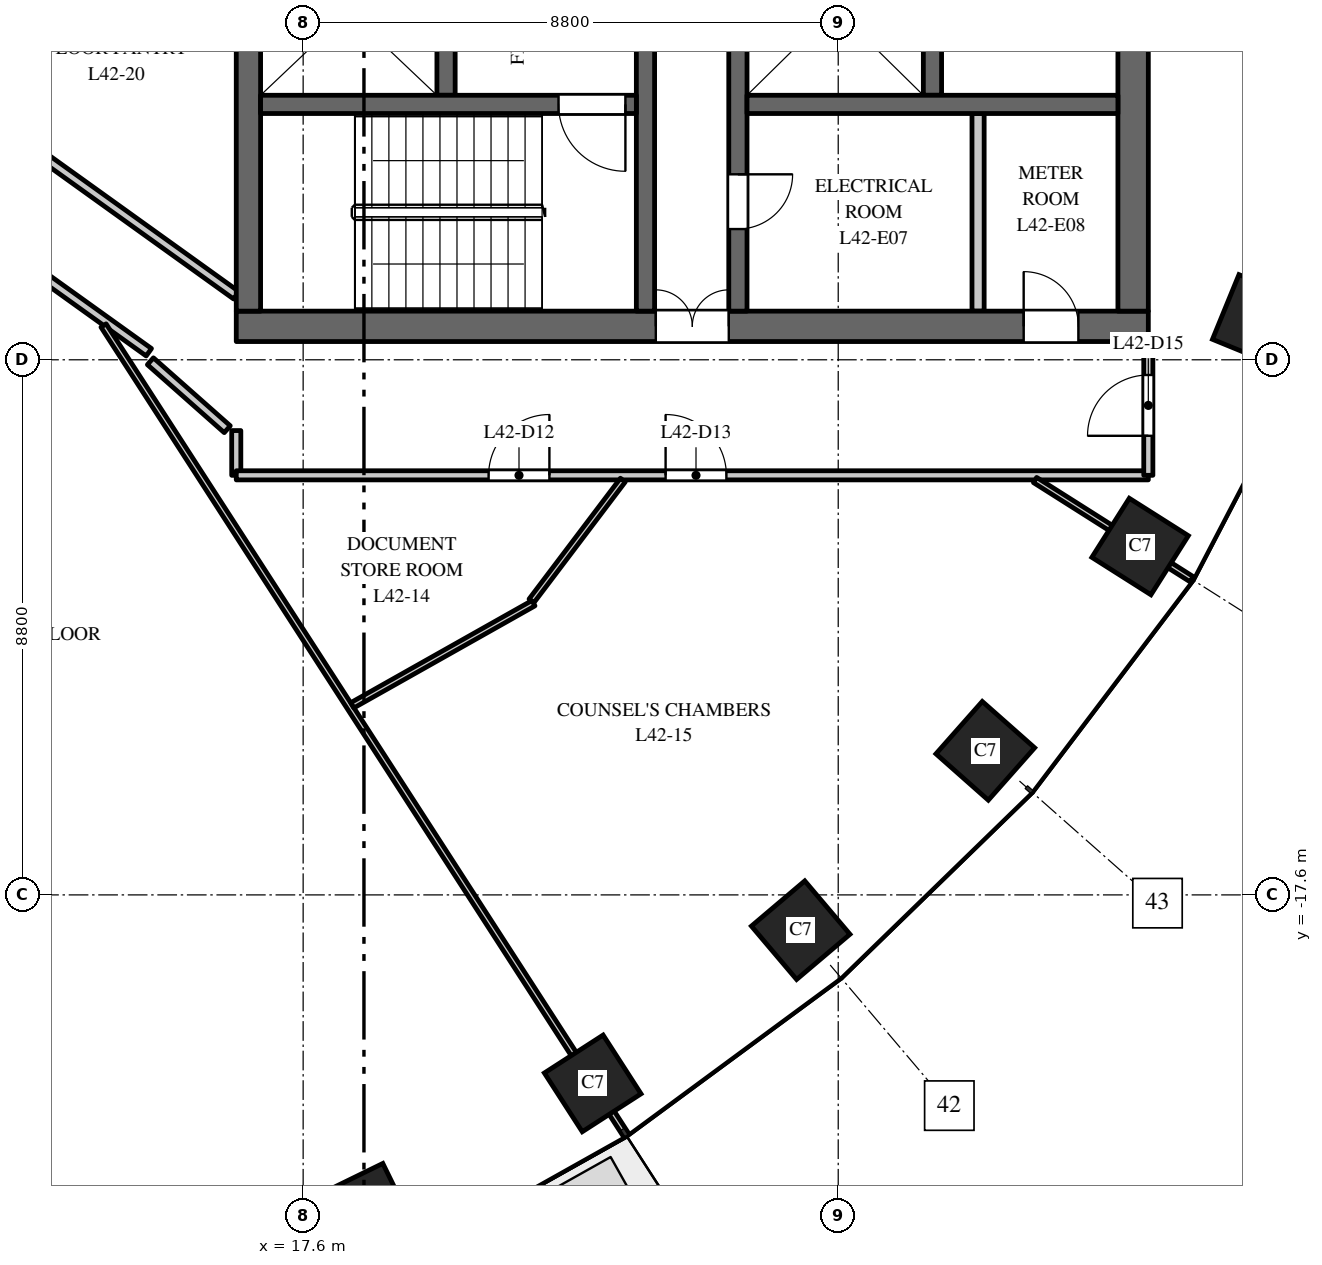
"""IFC4 building model, lengths in metres.
Left out: names, types, materials, properties, quantities, classifications, styles, units other than length and angle.
Written with IfcOpenShell. Run it as: python <this file> out.ifc"""

import sys

from ifc_helpers import new_model, si_unit, direction, frame, frame_2d, origin, origin_2d, place, context, subcontext, project, spatial, rectangle, extrude, element, fill, save


model = new_model("IFC4")
c1 = context("Model", 3, precision=1e-05, world=origin(), true_north=direction((0.0, 1.0)))
c2 = subcontext(c1, "Body", "Model", "MODEL_VIEW")
j1 = project(units=[si_unit("LENGTHUNIT", "METRE"), si_unit("PLANEANGLEUNIT", "RADIAN")], contexts=[c1])
p1 = place(None, origin())
s1 = spatial("IfcSite", under=j1, at=p1, CompositionType="ELEMENT")
p2 = place(p1, origin())
s2 = spatial("IfcBuilding", under=s1, at=p2, CompositionType="ELEMENT")
p3 = place(p2, frame((0.0, 0.0, 182.0)))
s3 = spatial("IfcBuildingStorey", under=s2, at=p3, CompositionType="ELEMENT", Elevation=182.0)
for number, where, z_axis, x_axis in (
    (1, (18.646, -22.785, 0.0), (0.0, 0.0, 1.0), (0.898, 0.439, 0.0)),
    (2, (22.362, -20.7, 0.0), (0.0, 0.0, 1.0), (0.84, 0.542, 0.0)),
    (3, (25.783, -18.18, 0.0), (0.0, 0.0, 1.0), (0.763, 0.646, 0.0)),
    (4, (28.819, -15.23, 0.0), (0.0, 0.0, 1.0), (0.663, 0.749, 0.0)),
    (5, (31.365, -11.871, 0.0), (0.0, 0.0, 1.0), (0.535, 0.845, 0.0)),
    (6, (33.305, -8.149, 0.0), (0.0, 0.0, 1.0), (0.379, 0.925, 0.0)),
):
    element("IfcColumn", number, at=place(p3, frame(where, z_axis=z_axis, x_axis=x_axis)), inside=s3, PredefinedType="COLUMN", context=c2, shape_type="SweptSolid", body=[
        extrude(rectangle(XDim=1.15, YDim=1.15, at=origin_2d()), origin(), (0.0, 0.0, 1.0), 4.0),
    ])
p4 = place(p3, frame((16.5, -8.25, 0.0), z_axis=(0.0, 0.0, 1.0), x_axis=(1.0, 0.0, 0.0)))
e7 = element("IfcWall", 7, at=p4, inside=s3, PredefinedType="SHEAR", context=c2, shape_type="SweptSolid", body=[
    extrude(rectangle(XDim=15.0, YDim=0.5, at=frame_2d((7.5, 0.0))), origin(), (0.0, 0.0, 1.0), 3.7),
])
p5 = place(p4, frame((6.9, 0.0, 0.0)))
e8 = element("IfcOpeningElement", 8, at=p5, cuts=e7, PredefinedType="OPENING", context=c2, shape_type="SweptSolid", body=[
    extrude(rectangle(XDim=1.2, YDim=2.1, at=frame_2d((0.6, 1.05))), frame((0.0, 0.26, 0.0), z_axis=(0.0, -1.0, 0.0), x_axis=(1.0, 0.0, 0.0)), (0.0, 0.0, 1.0), 0.52),
])
p6 = place(p4, frame((12.95, 0.0, 0.0)))
e9 = element("IfcOpeningElement", 9, at=p6, cuts=e7, PredefinedType="OPENING", context=c2, shape_type="SweptSolid", body=[
    extrude(rectangle(XDim=0.9, YDim=2.1, at=frame_2d((0.45, 1.05))), frame((0.0, 0.26, 0.0), z_axis=(0.0, -1.0, 0.0), x_axis=(1.0, 0.0, 0.0)), (0.0, 0.0, 1.0), 0.52),
])
p7 = place(p3, frame((27.95, -4.45, 0.0), z_axis=(0.0, 0.0, 1.0), x_axis=(0.0, 1.0, 0.0)))
e10 = element("IfcWall", 10, at=p7, inside=s3, PredefinedType="SHEAR", context=c2, shape_type="SweptSolid", body=[
    extrude(rectangle(XDim=8.9, YDim=0.3, at=frame_2d((4.45, 0.0))), origin(), (0.0, 0.0, 1.0), 3.7),
])
p8 = place(p3, frame((19.95, -4.45, 0.0), z_axis=(0.0, 0.0, 1.0), x_axis=(0.0, 1.0, 0.0)))
e11 = element("IfcWall", 11, at=p8, inside=s3, PredefinedType="SHEAR", context=c2, shape_type="SweptSolid", body=[
    extrude(rectangle(XDim=8.9, YDim=0.3, at=frame_2d((4.45, 0.0))), origin(), (0.0, 0.0, 1.0), 3.7),
])
p9 = place(p8, frame((0.775, 0.0, 0.0)))
e12 = element("IfcOpeningElement", 12, at=p9, cuts=e11, PredefinedType="OPENING", context=c2, shape_type="SweptSolid", body=[
    extrude(rectangle(XDim=1.2, YDim=2.1, at=frame_2d((0.6, 1.05))), frame((0.0, 0.16, 0.0), z_axis=(0.0, -1.0, 0.0), x_axis=(1.0, 0.0, 0.0)), (0.0, 0.0, 1.0), 0.32),
])
p10 = place(p8, frame((4.675, 0.0, 0.0)))
e13 = element("IfcOpeningElement", 13, at=p10, cuts=e11, PredefinedType="OPENING", context=c2, shape_type="SweptSolid", body=[
    extrude(rectangle(XDim=1.1, YDim=2.1, at=frame_2d((0.55, 1.05))), frame((0.0, 0.16, 0.0), z_axis=(0.0, -1.0, 0.0), x_axis=(1.0, 0.0, 0.0)), (0.0, 0.0, 1.0), 0.32),
])
p11 = place(p8, frame((7.25, 0.0, 0.0)))
e14 = element("IfcOpeningElement", 14, at=p11, cuts=e11, PredefinedType="OPENING", context=c2, shape_type="SweptSolid", body=[
    extrude(rectangle(XDim=1.1, YDim=2.1, at=frame_2d((0.55, 1.05))), frame((0.0, 0.16, 0.0), z_axis=(0.0, -1.0, 0.0), x_axis=(1.0, 0.0, 0.0)), (0.0, 0.0, 1.0), 0.32),
])
p12 = place(p3, frame((24.75, -8.0, 0.0), z_axis=(0.0, 0.0, 1.0), x_axis=(0.0, 1.0, 0.0)))
e15 = element("IfcWall", 15, at=p12, inside=s3, PredefinedType="SHEAR", context=c2, shape_type="SweptSolid", body=[
    extrude(rectangle(XDim=16.0, YDim=0.3, at=frame_2d((8.0, 0.0))), origin(), (0.0, 0.0, 1.0), 3.7),
])
p13 = place(p12, frame((4.425, 0.0, 0.0)))
e16 = element("IfcOpeningElement", 16, at=p13, cuts=e15, PredefinedType="OPENING", context=c2, shape_type="SweptSolid", body=[
    extrude(rectangle(XDim=1.1, YDim=2.1, at=frame_2d((0.55, 1.05))), frame((0.0, 0.16, 0.0), z_axis=(0.0, -1.0, 0.0), x_axis=(1.0, 0.0, 0.0)), (0.0, 0.0, 1.0), 0.32),
])
p14 = place(p12, frame((7.45, 0.0, 0.0)))
e17 = element("IfcOpeningElement", 17, at=p14, cuts=e15, PredefinedType="OPENING", context=c2, shape_type="SweptSolid", body=[
    extrude(rectangle(XDim=1.1, YDim=2.1, at=frame_2d((0.55, 1.05))), frame((0.0, 0.16, 0.0), z_axis=(0.0, -1.0, 0.0), x_axis=(1.0, 0.0, 0.0)), (0.0, 0.0, 1.0), 0.32),
])
p15 = place(p12, frame((10.475, 0.0, 0.0)))
e18 = element("IfcOpeningElement", 18, at=p15, cuts=e15, PredefinedType="OPENING", context=c2, shape_type="SweptSolid", body=[
    extrude(rectangle(XDim=1.1, YDim=2.1, at=frame_2d((0.55, 1.05))), frame((0.0, 0.16, 0.0), z_axis=(0.0, -1.0, 0.0), x_axis=(1.0, 0.0, 0.0)), (0.0, 0.0, 1.0), 0.32),
])
p16 = place(p12, frame((13.125, 0.0, 0.0)))
e19 = element("IfcOpeningElement", 19, at=p16, cuts=e15, PredefinedType="OPENING", context=c2, shape_type="SweptSolid", body=[
    extrude(rectangle(XDim=0.9, YDim=2.1, at=frame_2d((0.45, 1.05))), frame((0.0, 0.16, 0.0), z_axis=(0.0, -1.0, 0.0), x_axis=(1.0, 0.0, 0.0)), (0.0, 0.0, 1.0), 0.32),
])
p17 = place(p12, frame((14.75, 0.0, 0.0)))
e20 = element("IfcOpeningElement", 20, at=p17, cuts=e15, PredefinedType="OPENING", context=c2, shape_type="SweptSolid", body=[
    extrude(rectangle(XDim=0.9, YDim=2.1, at=frame_2d((0.45, 1.05))), frame((0.0, 0.16, 0.0), z_axis=(0.0, -1.0, 0.0), x_axis=(1.0, 0.0, 0.0)), (0.0, 0.0, 1.0), 0.32),
])
p18 = place(p12, frame((1.35, 0.0, 0.0)))
e21 = element("IfcOpeningElement", 21, at=p18, cuts=e15, PredefinedType="OPENING", context=c2, shape_type="SweptSolid", body=[
    extrude(rectangle(XDim=0.9, YDim=2.1, at=frame_2d((0.45, 1.05))), frame((0.0, 0.16, 0.0), z_axis=(0.0, -1.0, 0.0), x_axis=(1.0, 0.0, 0.0)), (0.0, 0.0, 1.0), 0.32),
])
p19 = place(p3, frame((16.7, -8.0, 0.0), z_axis=(0.0, 0.0, 1.0), x_axis=(0.0, 1.0, 0.0)))
e22 = element("IfcWall", 22, at=p19, inside=s3, PredefinedType="SHEAR", context=c2, shape_type="SweptSolid", body=[
    extrude(rectangle(XDim=16.0, YDim=0.4, at=frame_2d((8.0, 0.0))), origin(), (0.0, 0.0, 1.0), 3.7),
])
p20 = place(p3, frame((31.25, -8.0, 0.0), z_axis=(0.0, 0.0, 1.0), x_axis=(0.0, 1.0, 0.0)))
e23 = element("IfcWall", 23, at=p20, inside=s3, PredefinedType="SHEAR", context=c2, shape_type="SweptSolid", body=[
    extrude(rectangle(XDim=16.0, YDim=0.5, at=frame_2d((8.0, 0.0))), origin(), (0.0, 0.0, 1.0), 3.7),
])
p21 = place(p3, frame((28.7, -8.0, 0.0), z_axis=(0.0, 0.0, 1.0), x_axis=(0.0, 1.0, 0.0)))
e24 = element("IfcWall", 24, at=p21, inside=s3, PredefinedType="PARTITIONING", context=c2, shape_type="SweptSolid", body=[
    extrude(rectangle(XDim=3.25, YDim=0.2, at=frame_2d((1.625, 0.0))), origin(), (0.0, 0.0, 1.0), 3.7),
])
p22 = place(p3, frame((24.9, -4.6, 0.0), z_axis=(0.0, 0.0, 1.0), x_axis=(1.0, 0.0, 0.0)))
e25 = element("IfcWall", 25, at=p22, inside=s3, PredefinedType="SHEAR", context=c2, shape_type="SweptSolid", body=[
    extrude(rectangle(XDim=6.1, YDim=0.3, at=frame_2d((3.05, 0.0))), origin(), (0.0, 0.0, 1.0), 3.7),
])
p23 = place(p3, frame((23.23, -8.0, 0.0), z_axis=(0.0, 0.0, 1.0), x_axis=(0.0, 1.0, 0.0)))
e26 = element("IfcWall", 26, at=p23, inside=s3, PredefinedType="SHEAR", context=c2, shape_type="SweptSolid", body=[
    extrude(rectangle(XDim=7.875, YDim=0.3, at=frame_2d((3.938, 0.0))), origin(), (0.0, 0.0, 1.0), 3.7),
])
p24 = place(p23, frame((5.15, 0.0, 0.0)))
e27 = element("IfcOpeningElement", 27, at=p24, cuts=e26, PredefinedType="OPENING", context=c2, shape_type="SweptSolid", body=[
    extrude(rectangle(XDim=1.1, YDim=2.1, at=frame_2d((0.55, 1.05))), frame((0.0, 0.16, 0.0), z_axis=(0.0, -1.0, 0.0), x_axis=(1.0, 0.0, 0.0)), (0.0, 0.0, 1.0), 0.32),
])
p25 = place(p3, frame((16.9, -4.6, 0.0), z_axis=(0.0, 0.0, 1.0), x_axis=(1.0, 0.0, 0.0)))
e28 = element("IfcWall", 28, at=p25, inside=s3, PredefinedType="SHEAR", context=c2, shape_type="SweptSolid", body=[
    extrude(rectangle(XDim=6.18, YDim=0.3, at=frame_2d((3.09, 0.0))), origin(), (0.0, 0.0, 1.0), 3.7),
])
p26 = place(p25, frame((4.9, 0.0, 0.0)))
e29 = element("IfcOpeningElement", 29, at=p26, cuts=e28, PredefinedType="OPENING", context=c2, shape_type="SweptSolid", body=[
    extrude(rectangle(XDim=1.1, YDim=2.1, at=frame_2d((0.55, 1.05))), frame((0.0, 0.16, 0.0), z_axis=(0.0, -1.0, 0.0), x_axis=(1.0, 0.0, 0.0)), (0.0, 0.0, 1.0), 0.32),
])
p27 = place(p3, frame((10.351, -5.296, 0.0), z_axis=(0.0, 0.0, 1.0), x_axis=(0.812494026232, -0.582969516645, 0.0)))
e30 = element("IfcWall", 30, at=p27, inside=s3, PredefinedType="PARTITIONING", context=c2, shape_type="SweptSolid", body=[
    extrude(rectangle(XDim=5.798, YDim=0.15, at=frame_2d((2.899, 0.0))), origin(), (0.0, 0.0, 1.0), 2.75),
])
p28 = place(p3, frame((11.203, -3.938, 0.0), z_axis=(0.0, 0.0, 1.0), x_axis=(0.812471543061, -0.583000850528, 0.0)))
e31 = element("IfcWall", 31, at=p28, inside=s3, PredefinedType="PARTITIONING", context=c2, shape_type="SweptSolid", body=[
    extrude(rectangle(XDim=6.52, YDim=0.15, at=frame_2d((3.26, 0.0))), origin(), (0.0, 0.0, 1.0), 3.7),
])
p29 = place(p28, frame((0.5, 0.0, 0.0)))
e32 = element("IfcOpeningElement", 32, at=p29, cuts=e31, PredefinedType="OPENING", context=c2, shape_type="SweptSolid", body=[
    extrude(rectangle(XDim=1.0, YDim=2.1, at=frame_2d((0.5, 1.05))), frame((0.0, 0.085, 0.0), z_axis=(0.0, -1.0, 0.0), x_axis=(1.0, 0.0, 0.0)), (0.0, 0.0, 1.0), 0.17),
])
p30 = place(p3, frame((14.317, -8.236, 0.0), z_axis=(0.0, 0.0, 1.0), x_axis=(0.542334368531, -0.840162741801, 0.0)))
e33 = element("IfcWall", 33, at=p30, inside=s3, PredefinedType="PARTITIONING", context=c2, shape_type="SweptSolid", body=[
    extrude(rectangle(XDim=15.837, YDim=0.1, at=frame_2d((7.919, 0.0))), origin(), (0.0, 0.0, 1.0), 3.7),
])
p31 = place(p3, frame((16.5, -10.7, 0.0), z_axis=(0.0, 0.0, 1.0), x_axis=(0.0, 1.0, 0.0)))
e34 = element("IfcWall", 34, at=p31, inside=s3, PredefinedType="PARTITIONING", context=c2, shape_type="SweptSolid", body=[
    extrude(rectangle(XDim=0.736, YDim=0.15, at=frame_2d((0.368, 0.0))), origin(), (0.0, 0.0, 1.0), 3.7),
])
p32 = place(p3, frame((16.5, -10.7, 0.0), z_axis=(0.0, 0.0, 1.0), x_axis=(1.0, 0.0, 0.0)))
e35 = element("IfcWall", 35, at=p32, inside=s3, PredefinedType="PARTITIONING", context=c2, shape_type="SweptSolid", body=[
    extrude(rectangle(XDim=15.0, YDim=0.15, at=frame_2d((7.5, 0.0))), origin(), (0.0, 0.0, 1.0), 2.75),
])
p33 = place(p32, frame((4.15, 0.0, 0.0)))
e36 = element("IfcOpeningElement", 36, at=p33, cuts=e35, PredefinedType="OPENING", context=c2, shape_type="SweptSolid", body=[
    extrude(rectangle(XDim=1.0, YDim=2.1, at=frame_2d((0.5, 1.05))), frame((0.0, 0.085, 0.0), z_axis=(0.0, -1.0, 0.0), x_axis=(1.0, 0.0, 0.0)), (0.0, 0.0, 1.0), 0.17),
])
p34 = place(p32, frame((7.061, 0.0, 0.0)))
e37 = element("IfcOpeningElement", 37, at=p34, cuts=e35, PredefinedType="OPENING", context=c2, shape_type="SweptSolid", body=[
    extrude(rectangle(XDim=1.0, YDim=2.1, at=frame_2d((0.5, 1.05))), frame((0.0, 0.085, 0.0), z_axis=(0.0, -1.0, 0.0), x_axis=(1.0, 0.0, 0.0)), (0.0, 0.0, 1.0), 0.17),
])
p35 = place(p3, frame((18.409, -14.482, 0.0), z_axis=(0.0, 0.0, 1.0), x_axis=(0.871167200766, 0.490986464487, 0.0)))
e38 = element("IfcWall", 38, at=p35, inside=s3, PredefinedType="PARTITIONING", context=c2, shape_type="SweptSolid", body=[
    extrude(rectangle(XDim=3.419, YDim=0.1, at=frame_2d((1.71, 0.0))), origin(), (0.0, 0.0, 1.0), 3.7),
])
p36 = place(p3, frame((21.355, -12.765, 0.0), z_axis=(0.0, 0.0, 1.0), x_axis=(0.603287715996, 0.797523624558, 0.0)))
e39 = element("IfcWall", 39, at=p36, inside=s3, PredefinedType="PARTITIONING", context=c2, shape_type="SweptSolid", body=[
    extrude(rectangle(XDim=2.491, YDim=0.1, at=frame_2d((1.246, 0.0))), origin(), (0.0, 0.0, 1.0), 2.75),
])
p37 = place(p3, frame((29.637, -10.777, 0.0), z_axis=(0.0, 0.0, 1.0), x_axis=(0.844810627195, -0.535065420467, 0.0)))
e40 = element("IfcWall", 40, at=p37, inside=s3, PredefinedType="PARTITIONING", context=c2, shape_type="SweptSolid", body=[
    extrude(rectangle(XDim=3.048, YDim=0.1, at=frame_2d((1.524, 0.0))), origin(), (0.0, 0.0, 1.0), 2.9),
])
p38 = place(p3, frame((31.5, -10.7, 0.0), z_axis=(0.0, 0.0, 1.0), x_axis=(0.0, 1.0, 0.0)))
e41 = element("IfcWall", 41, at=p38, inside=s3, PredefinedType="PARTITIONING", context=c2, shape_type="SweptSolid", body=[
    extrude(rectangle(XDim=2.2, YDim=0.15, at=frame_2d((1.1, 0.0))), origin(), (0.0, 0.0, 1.0), 2.9),
])
p39 = place(p38, frame((0.65, 0.0, 0.0)))
e42 = element("IfcOpeningElement", 42, at=p39, cuts=e41, PredefinedType="OPENING", context=c2, shape_type="SweptSolid", body=[
    extrude(rectangle(XDim=1.0, YDim=2.1, at=frame_2d((0.5, 1.05))), frame((0.0, 0.085, 0.0), z_axis=(0.0, -1.0, 0.0), x_axis=(1.0, 0.0, 0.0)), (0.0, 0.0, 1.0), 0.17),
])
p40 = place(p3, frame((16.352, -9.942, 0.0), z_axis=(0.0, 0.0, 1.0), x_axis=(-0.749107006374, 0.662449011624, 0.0)))
e43 = element("IfcWall", 43, at=p40, inside=s3, PredefinedType="PARTITIONING", context=c2, shape_type="SweptSolid", body=[
    extrude(rectangle(XDim=1.688, YDim=0.15, at=frame_2d((0.844, 0.0))), origin(), (0.0, 0.0, 1.0), 3.7),
])
p41 = place(p26, origin())
e44 = element("IfcDoor", 44, at=p41, inside=s3, OperationType="SINGLE_SWING_RIGHT", PredefinedType="DOOR", context=c2, shape_type="SweptSolid", body=[
    extrude(rectangle(XDim=1.1, YDim=2.1, at=frame_2d((0.55, 1.05))), frame((0.0, 0.025, 0.0), z_axis=(0.0, -1.0, 0.0), x_axis=(1.0, 0.0, 0.0)), (0.0, 0.0, 1.0), 0.05),
])
fill(e29, e44)
p42 = place(p5, origin())
e45 = element("IfcDoor", 45, at=p42, inside=s3, OperationType="DOUBLE_DOOR_DOUBLE_SWING", PredefinedType="DOOR", context=c2, shape_type="SweptSolid", body=[
    extrude(rectangle(XDim=1.2, YDim=2.1, at=frame_2d((0.6, 1.05))), frame((0.0, 0.025, 0.0), z_axis=(0.0, -1.0, 0.0), x_axis=(1.0, 0.0, 0.0)), (0.0, 0.0, 1.0), 0.05),
])
fill(e8, e45)
p43 = place(p18, origin())
e46 = element("IfcDoor", 46, at=p43, inside=s3, OperationType="SINGLE_SWING_RIGHT", PredefinedType="DOOR", context=c2, shape_type="SweptSolid", body=[
    extrude(rectangle(XDim=0.9, YDim=2.1, at=frame_2d((0.45, 1.05))), frame((0.0, 0.025, 0.0), z_axis=(0.0, -1.0, 0.0), x_axis=(1.0, 0.0, 0.0)), (0.0, 0.0, 1.0), 0.05),
])
fill(e21, e46)
p44 = place(p6, origin())
e47 = element("IfcDoor", 47, at=p44, inside=s3, OperationType="SINGLE_SWING_RIGHT", PredefinedType="DOOR", context=c2, shape_type="SweptSolid", body=[
    extrude(rectangle(XDim=0.9, YDim=2.1, at=frame_2d((0.45, 1.05))), frame((0.0, 0.025, 0.0), z_axis=(0.0, -1.0, 0.0), x_axis=(1.0, 0.0, 0.0)), (0.0, 0.0, 1.0), 0.05),
])
fill(e9, e47)
p45 = place(p33, origin())
e48 = element("IfcDoor", 48, at=p45, inside=s3, OperationType="SINGLE_SWING_RIGHT", PredefinedType="DOOR", context=c2, shape_type="SweptSolid", body=[
    extrude(rectangle(XDim=1.0, YDim=2.1, at=frame_2d((0.5, 1.05))), frame((0.0, 0.025, 0.0), z_axis=(0.0, -1.0, 0.0), x_axis=(1.0, 0.0, 0.0)), (0.0, 0.0, 1.0), 0.05),
])
fill(e36, e48)
p46 = place(p34, origin())
e49 = element("IfcDoor", 49, at=p46, inside=s3, OperationType="SINGLE_SWING_LEFT", PredefinedType="DOOR", context=c2, shape_type="SweptSolid", body=[
    extrude(rectangle(XDim=1.0, YDim=2.1, at=frame_2d((0.5, 1.05))), frame((0.0, 0.025, 0.0), z_axis=(0.0, -1.0, 0.0), x_axis=(1.0, 0.0, 0.0)), (0.0, 0.0, 1.0), 0.05),
])
fill(e37, e49)
p47 = place(p39, origin())
e50 = element("IfcDoor", 50, at=p47, inside=s3, OperationType="SINGLE_SWING_LEFT", PredefinedType="DOOR", context=c2, shape_type="SweptSolid", body=[
    extrude(rectangle(XDim=1.0, YDim=2.1, at=frame_2d((0.5, 1.05))), frame((0.0, 0.025, 0.0), z_axis=(0.0, -1.0, 0.0), x_axis=(1.0, 0.0, 0.0)), (0.0, 0.0, 1.0), 0.05),
])
fill(e42, e50)
save(model, sys.argv[1])
